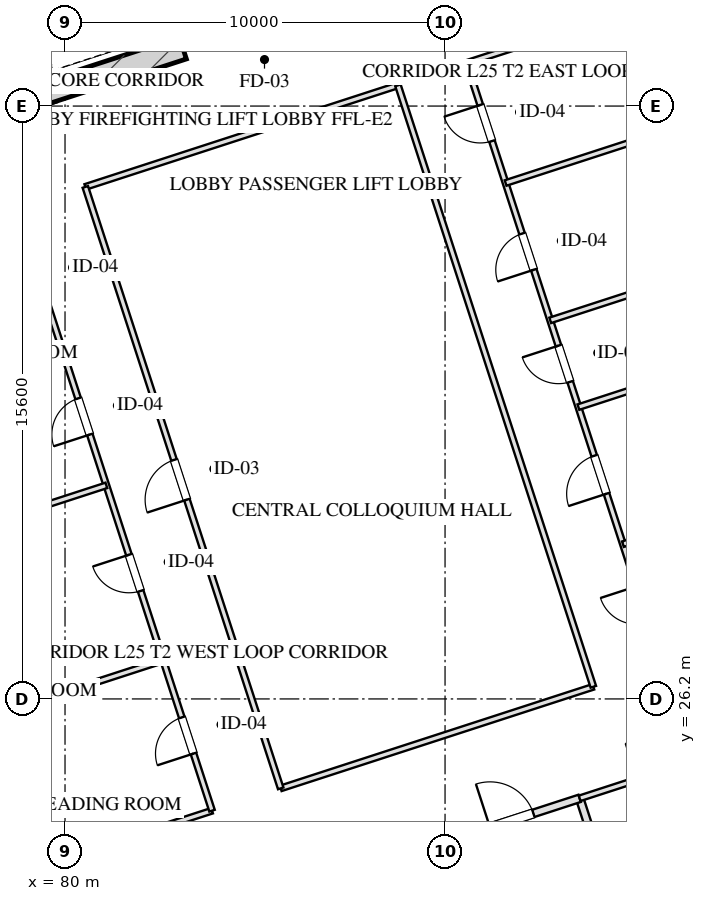
"""IFC4 building model, lengths in metres.
Left out: names, types, materials, properties, quantities, classifications, styles, units other than length and angle.
Written with IfcOpenShell. Run it as: python <this file> out.ifc"""

import sys

from ifc_helpers import new_model, si_unit, direction, frame, frame_2d, origin, place, context, subcontext, project, spatial, rectangle, extrude, element, fill, save


model = new_model("IFC4")
c1 = context("Model", 3, precision=1e-05, world=origin(), true_north=direction((0.0, 1.0)))
c2 = subcontext(c1, "Body", "Model", "MODEL_VIEW")
j1 = project(units=[si_unit("LENGTHUNIT", "METRE"), si_unit("PLANEANGLEUNIT", "RADIAN")], contexts=[c1])
p1 = place(None, origin())
s1 = spatial("IfcSite", under=j1, at=p1, CompositionType="ELEMENT")
p2 = place(p1, origin())
s2 = spatial("IfcBuilding", under=s1, at=p2, CompositionType="ELEMENT")
p3 = place(p2, frame((0.0, 0.0, 100.05)))
s3 = spatial("IfcBuildingStorey", under=s2, at=p3, CompositionType="ELEMENT", Elevation=100.05)
p4 = place(p3, frame((79.466, 41.828, 0.0), z_axis=(0.0, 0.0, 1.0), x_axis=(-0.309041232772, 0.951048640421, 0.0)))
e1 = element("IfcWall", 1, at=p4, inside=s3, PredefinedType="SHEAR", context=c2, shape_type="SweptSolid", body=[
    extrude(rectangle(XDim=9.48, YDim=0.6, at=frame_2d((4.74, 0.0))), origin(), (0.0, 0.0, 1.0), 3.45),
])
p5 = place(p3, frame((79.087, 42.021, 0.0), z_axis=(0.0, 0.0, 1.0), x_axis=(0.951062550203, 0.3089984233, 0.0)))
e2 = element("IfcWall", 2, at=p5, inside=s3, PredefinedType="SHEAR", context=c2, shape_type="SweptSolid", body=[
    extrude(rectangle(XDim=4.22, YDim=0.6, at=frame_2d((2.11, 0.0))), origin(), (0.0, 0.0, 1.0), 3.45),
])
p6 = place(p3, frame((80.716, 6.59, 0.0), z_axis=(0.0, 0.0, 1.0), x_axis=(-0.309017542002, 0.95105633836, 0.0)))
e3 = element("IfcWall", 3, at=p6, inside=s3, PredefinedType="SOLIDWALL", context=c2, shape_type="SweptSolid", body=[
    extrude(rectangle(XDim=46.4, YDim=0.4, at=frame_2d((23.2, 0.0))), origin(), (0.0, 0.0, 1.0), 2.55),
])
p7 = place(p6, frame((15.6, 0.0, 0.75)))
e4 = element("IfcOpeningElement", 4, at=p7, cuts=e3, PredefinedType="OPENING", context=c2, shape_type="SweptSolid", body=[
    extrude(rectangle(XDim=2.4, YDim=1.4, at=frame_2d((1.2, 0.7))), frame((0.0, 0.21, 0.0), z_axis=(0.0, -1.0, 0.0), x_axis=(1.0, 0.0, 0.0)), (0.0, 0.0, 1.0), 0.42),
])
p8 = place(p6, frame((19.4, 0.0, 0.75)))
e5 = element("IfcOpeningElement", 5, at=p8, cuts=e3, PredefinedType="OPENING", context=c2, shape_type="SweptSolid", body=[
    extrude(rectangle(XDim=2.4, YDim=1.4, at=frame_2d((1.2, 0.7))), frame((0.0, 0.21, 0.0), z_axis=(0.0, -1.0, 0.0), x_axis=(1.0, 0.0, 0.0)), (0.0, 0.0, 1.0), 0.42),
])
p9 = place(p6, frame((25.496, 0.0, 0.0)))
e6 = element("IfcOpeningElement", 6, at=p9, cuts=e3, PredefinedType="OPENING", context=c2, shape_type="SweptSolid", body=[
    extrude(rectangle(XDim=1.1, YDim=2.15, at=frame_2d((0.55, 1.075))), frame((0.0, 0.21, 0.0), z_axis=(0.0, -1.0, 0.0), x_axis=(1.0, 0.0, 0.0)), (0.0, 0.0, 1.0), 0.42),
])
p10 = place(p3, frame((93.542, 23.585, 0.0), z_axis=(0.0, 0.0, 1.0), x_axis=(0.309042196757, -0.951048327176, 0.0)))
e7 = element("IfcWall", 7, at=p10, inside=s3, PredefinedType="PARTITIONING", context=c2, shape_type="SweptSolid", body=[
    extrude(rectangle(XDim=8.43, YDim=0.2, at=frame_2d((4.215, 0.0))), origin(), (0.0, 0.0, 1.0), 3.155),
])
p11 = place(p3, frame((89.899, 22.401, 0.0), z_axis=(0.0, 0.0, 1.0), x_axis=(0.951046716504, 0.309047153403, 0.0)))
e8 = element("IfcWall", 8, at=p11, inside=s3, PredefinedType="PARTITIONING", context=c2, shape_type="SweptSolid", body=[
    extrude(rectangle(XDim=3.83, YDim=0.2, at=frame_2d((1.915, 0.0))), origin(), (0.0, 0.0, 1.0), 3.155),
])
p12 = place(p11, frame((1.35, 0.0, 0.0)))
e9 = element("IfcOpeningElement", 9, at=p12, cuts=e8, PredefinedType="OPENING", context=c2, shape_type="SweptSolid", body=[
    extrude(rectangle(XDim=1.2, YDim=2.05, at=frame_2d((0.6, 1.025))), frame((0.0, 0.11, 0.0), z_axis=(0.0, -1.0, 0.0), x_axis=(1.0, 0.0, 0.0)), (0.0, 0.0, 1.0), 0.22),
])
p13 = place(p3, frame((93.542, 23.585, 0.0), z_axis=(0.0, 0.0, 1.0), x_axis=(0.951063829732, 0.308994485023, 0.0)))
e10 = element("IfcWall", 10, at=p13, inside=s3, PredefinedType="PARTITIONING", context=c2, shape_type="SweptSolid", body=[
    extrude(rectangle(XDim=4.4, YDim=0.15, at=frame_2d((2.2, 0.0))), origin(), (0.0, 0.0, 1.0), 3.155),
])
p14 = place(p13, frame((1.6, 0.0, 0.0)))
e11 = element("IfcOpeningElement", 11, at=p14, cuts=e10, PredefinedType="OPENING", context=c2, shape_type="SweptSolid", body=[
    extrude(rectangle(XDim=1.0, YDim=2.05, at=frame_2d((0.5, 1.025))), frame((0.0, 0.085, 0.0), z_axis=(0.0, -1.0, 0.0), x_axis=(1.0, 0.0, 0.0)), (0.0, 0.0, 1.0), 0.17),
])
p15 = place(p3, frame((76.308, 20.803, 0.0), z_axis=(0.0, 0.0, 1.0), x_axis=(0.95105437725, 0.3090235776, 0.0)))
e12 = element("IfcWall", 12, at=p15, inside=s3, PredefinedType="PARTITIONING", context=c2, shape_type="SweptSolid", body=[
    extrude(rectangle(XDim=7.95, YDim=0.15, at=frame_2d((3.975, 0.0))), origin(), (0.0, 0.0, 1.0), 3.155),
])
p16 = place(p3, frame((85.676, 23.847, 0.0), z_axis=(0.0, 0.0, 1.0), x_axis=(0.951063309554, 0.308996086091, 0.0)))
e13 = element("IfcWall", 13, at=p16, inside=s3, PredefinedType="PARTITIONING", context=c2, shape_type="SweptSolid", body=[
    extrude(rectangle(XDim=8.65, YDim=0.15, at=frame_2d((4.325, 0.0))), origin(), (0.0, 0.0, 1.0), 3.155),
])
p17 = place(p3, frame((80.534, 39.672, 0.0), z_axis=(0.0, 0.0, 1.0), x_axis=(0.951052319652, 0.309029910015, 0.0)))
e14 = element("IfcWall", 14, at=p17, inside=s3, PredefinedType="PARTITIONING", context=c2, shape_type="SweptSolid", body=[
    extrude(rectangle(XDim=8.65, YDim=0.15, at=frame_2d((4.325, 0.0))), origin(), (0.0, 0.0, 1.0), 3.155),
])
p18 = place(p3, frame((90.567, 42.933, 0.0), z_axis=(0.0, 0.0, 1.0), x_axis=(0.951058377365, 0.309011266531, 0.0)))
e15 = element("IfcWall", 15, at=p18, inside=s3, PredefinedType="PARTITIONING", context=c2, shape_type="SweptSolid", body=[
    extrude(rectangle(XDim=13.8, YDim=0.15, at=frame_2d((6.9, 0.0))), origin(), (0.0, 0.0, 1.0), 3.155),
])
p19 = place(p3, frame((83.869, 23.26, 0.0), z_axis=(0.0, 0.0, 1.0), x_axis=(-0.309022042254, 0.951054876125, 0.0)))
e16 = element("IfcWall", 16, at=p19, inside=s3, PredefinedType="PARTITIONING", context=c2, shape_type="SweptSolid", body=[
    extrude(rectangle(XDim=16.64, YDim=0.15, at=frame_2d((8.32, 0.0))), origin(), (0.0, 0.0, 1.0), 3.155),
])
p20 = place(p19, frame((1.58, 0.0, 0.0)))
e17 = element("IfcOpeningElement", 17, at=p20, cuts=e16, PredefinedType="OPENING", context=c2, shape_type="SweptSolid", body=[
    extrude(rectangle(XDim=1.0, YDim=2.05, at=frame_2d((0.5, 1.025))), frame((0.0, 0.085, 0.0), z_axis=(0.0, -1.0, 0.0), x_axis=(1.0, 0.0, 0.0)), (0.0, 0.0, 1.0), 0.17),
])
p21 = place(p19, frame((6.08, 0.0, 0.0)))
e18 = element("IfcOpeningElement", 18, at=p21, cuts=e16, PredefinedType="OPENING", context=c2, shape_type="SweptSolid", body=[
    extrude(rectangle(XDim=1.0, YDim=2.05, at=frame_2d((0.5, 1.025))), frame((0.0, 0.085, 0.0), z_axis=(0.0, -1.0, 0.0), x_axis=(1.0, 0.0, 0.0)), (0.0, 0.0, 1.0), 0.17),
])
p22 = place(p19, frame((10.406, 0.0, 0.0)))
e19 = element("IfcOpeningElement", 19, at=p22, cuts=e16, PredefinedType="OPENING", context=c2, shape_type="SweptSolid", body=[
    extrude(rectangle(XDim=1.0, YDim=2.05, at=frame_2d((0.5, 1.025))), frame((0.0, 0.085, 0.0), z_axis=(0.0, -1.0, 0.0), x_axis=(1.0, 0.0, 0.0)), (0.0, 0.0, 1.0), 0.17),
])
p23 = place(p19, frame((14.226, 0.0, 0.0)))
e20 = element("IfcOpeningElement", 20, at=p23, cuts=e16, PredefinedType="OPENING", context=c2, shape_type="SweptSolid", body=[
    extrude(rectangle(XDim=1.0, YDim=2.05, at=frame_2d((0.5, 1.025))), frame((0.0, 0.085, 0.0), z_axis=(0.0, -1.0, 0.0), x_axis=(1.0, 0.0, 0.0)), (0.0, 0.0, 1.0), 0.17),
])
p24 = place(p3, frame((85.676, 23.847, 0.0), z_axis=(0.0, 0.0, 1.0), x_axis=(-0.309008771245, 0.951059188113, 0.0)))
e21 = element("IfcWall", 21, at=p24, inside=s3, PredefinedType="PARTITIONING", context=c2, shape_type="SweptSolid", body=[
    extrude(rectangle(XDim=16.64, YDim=0.15, at=frame_2d((8.32, 0.0))), origin(), (0.0, 0.0, 1.0), 3.155),
])
p25 = place(p24, frame((7.987, 0.0, 0.0)))
e22 = element("IfcOpeningElement", 22, at=p25, cuts=e21, PredefinedType="OPENING", context=c2, shape_type="SweptSolid", body=[
    extrude(rectangle(XDim=1.1, YDim=2.05, at=frame_2d((0.55, 1.025))), frame((0.0, 0.085, 0.0), z_axis=(0.0, -1.0, 0.0), x_axis=(1.0, 0.0, 0.0)), (0.0, 0.0, 1.0), 0.17),
])
p26 = place(p3, frame((93.903, 26.52, 0.0), z_axis=(0.0, 0.0, 1.0), x_axis=(-0.30901773025, 0.951056277195, 0.0)))
e23 = element("IfcWall", 23, at=p26, inside=s3, PredefinedType="PARTITIONING", context=c2, shape_type="SweptSolid", body=[
    extrude(rectangle(XDim=16.64, YDim=0.15, at=frame_2d((8.32, 0.0))), origin(), (0.0, 0.0, 1.0), 3.155),
])
p27 = place(p3, frame((95.709, 27.107, 0.0), z_axis=(0.0, 0.0, 1.0), x_axis=(-0.30901773025, 0.951056277195, 0.0)))
e24 = element("IfcWall", 24, at=p27, inside=s3, PredefinedType="PARTITIONING", context=c2, shape_type="SweptSolid", body=[
    extrude(rectangle(XDim=16.64, YDim=0.15, at=frame_2d((8.32, 0.0))), origin(), (0.0, 0.0, 1.0), 3.155),
])
p28 = place(p27, frame((1.164, 0.0, 0.0)))
e25 = element("IfcOpeningElement", 25, at=p28, cuts=e24, PredefinedType="OPENING", context=c2, shape_type="SweptSolid", body=[
    extrude(rectangle(XDim=1.0, YDim=2.05, at=frame_2d((0.5, 1.025))), frame((0.0, 0.085, 0.0), z_axis=(0.0, -1.0, 0.0), x_axis=(1.0, 0.0, 0.0)), (0.0, 0.0, 1.0), 0.17),
])
p29 = place(p27, frame((4.724, 0.0, 0.0)))
e26 = element("IfcOpeningElement", 26, at=p29, cuts=e24, PredefinedType="OPENING", context=c2, shape_type="SweptSolid", body=[
    extrude(rectangle(XDim=1.05, YDim=2.05, at=frame_2d((0.525, 1.025))), frame((0.0, 0.085, 0.0), z_axis=(0.0, -1.0, 0.0), x_axis=(1.0, 0.0, 0.0)), (0.0, 0.0, 1.0), 0.17),
])
p30 = place(p27, frame((7.82, 0.0, 0.0)))
e27 = element("IfcOpeningElement", 27, at=p30, cuts=e24, PredefinedType="OPENING", context=c2, shape_type="SweptSolid", body=[
    extrude(rectangle(XDim=1.0, YDim=2.05, at=frame_2d((0.5, 1.025))), frame((0.0, 0.085, 0.0), z_axis=(0.0, -1.0, 0.0), x_axis=(1.0, 0.0, 0.0)), (0.0, 0.0, 1.0), 0.17),
])
p31 = place(p27, frame((10.92, 0.0, 0.0)))
e28 = element("IfcOpeningElement", 28, at=p31, cuts=e24, PredefinedType="OPENING", context=c2, shape_type="SweptSolid", body=[
    extrude(rectangle(XDim=1.0, YDim=2.05, at=frame_2d((0.5, 1.025))), frame((0.0, 0.085, 0.0), z_axis=(0.0, -1.0, 0.0), x_axis=(1.0, 0.0, 0.0)), (0.0, 0.0, 1.0), 0.17),
])
p32 = place(p27, frame((14.48, 0.0, 0.0)))
e29 = element("IfcOpeningElement", 29, at=p32, cuts=e24, PredefinedType="OPENING", context=c2, shape_type="SweptSolid", body=[
    extrude(rectangle(XDim=1.0, YDim=2.05, at=frame_2d((0.5, 1.025))), frame((0.0, 0.085, 0.0), z_axis=(0.0, -1.0, 0.0), x_axis=(1.0, 0.0, 0.0)), (0.0, 0.0, 1.0), 0.17),
])
for number, where, z_axis, x_axis in (
    (30, (75.022, 24.76, 0.0), (0.0, 0.0, 1.0), (0.951, 0.309, 0.0)),
    (31, (73.527, 29.363, 0.0), (0.0, 0.0, 1.0), (0.951, 0.309, 0.0)),
    (32, (72.349, 32.989, 0.0), (0.0, 0.0, 1.0), (0.951, 0.309, 0.0)),
):
    element("IfcWall", number, at=place(p3, frame(where, z_axis=z_axis, x_axis=x_axis)), inside=s3, PredefinedType="PARTITIONING", context=c2, shape_type="SweptSolid", body=[
        extrude(rectangle(XDim=7.95, YDim=0.15, at=frame_2d((3.975, 0.0))), origin(), (0.0, 0.0, 1.0), 3.155),
    ])
p33 = place(p3, frame((94.681, 30.272, 0.0), z_axis=(0.0, 0.0, 1.0), x_axis=(0.951051488548, 0.309032467762, 0.0)))
e33 = element("IfcWall", 33, at=p33, inside=s3, PredefinedType="PARTITIONING", context=c2, shape_type="SweptSolid", body=[
    extrude(rectangle(XDim=13.8, YDim=0.15, at=frame_2d((6.9, 0.0))), origin(), (0.0, 0.0, 1.0), 3.155),
])
p34 = place(p3, frame((93.509, 33.878, 0.0), z_axis=(0.0, 0.0, 1.0), x_axis=(0.951056688031, 0.309016465825, 0.0)))
e34 = element("IfcWall", 34, at=p34, inside=s3, PredefinedType="PARTITIONING", context=c2, shape_type="SweptSolid", body=[
    extrude(rectangle(XDim=13.8, YDim=0.15, at=frame_2d((6.9, 0.0))), origin(), (0.0, 0.0, 1.0), 3.155),
])
p35 = place(p3, frame((92.768, 36.161, 0.0), z_axis=(0.0, 0.0, 1.0), x_axis=(0.951058377365, 0.309011266531, 0.0)))
e35 = element("IfcWall", 35, at=p35, inside=s3, PredefinedType="PARTITIONING", context=c2, shape_type="SweptSolid", body=[
    extrude(rectangle(XDim=13.8, YDim=0.15, at=frame_2d((6.9, 0.0))), origin(), (0.0, 0.0, 1.0), 3.155),
])
p36 = place(p3, frame((91.594, 39.775, 0.0), z_axis=(0.0, 0.0, 1.0), x_axis=(0.951056688031, 0.309016465825, 0.0)))
e36 = element("IfcWall", 36, at=p36, inside=s3, PredefinedType="PARTITIONING", context=c2, shape_type="SweptSolid", body=[
    extrude(rectangle(XDim=13.8, YDim=0.15, at=frame_2d((6.9, 0.0))), origin(), (0.0, 0.0, 1.0), 3.155),
])
p37 = place(p12, origin())
e37 = element("IfcDoor", 37, at=p37, inside=s3, OperationType="SINGLE_SWING_LEFT", PredefinedType="DOOR", context=c2, shape_type="SweptSolid", body=[
    extrude(rectangle(XDim=1.2, YDim=2.05, at=frame_2d((0.6, 1.025))), frame((0.0, 0.025, 0.0), z_axis=(0.0, -1.0, 0.0), x_axis=(1.0, 0.0, 0.0)), (0.0, 0.0, 1.0), 0.05),
])
fill(e9, e37)
p38 = place(p20, origin())
e38 = element("IfcDoor", 38, at=p38, inside=s3, OperationType="SINGLE_SWING_LEFT", PredefinedType="DOOR", context=c2, shape_type="SweptSolid", body=[
    extrude(rectangle(XDim=1.0, YDim=2.05, at=frame_2d((0.5, 1.025))), frame((0.0, 0.025, 0.0), z_axis=(0.0, -1.0, 0.0), x_axis=(1.0, 0.0, 0.0)), (0.0, 0.0, 1.0), 0.05),
])
fill(e17, e38)
p39 = place(p21, origin())
e39 = element("IfcDoor", 39, at=p39, inside=s3, OperationType="SINGLE_SWING_RIGHT", PredefinedType="DOOR", context=c2, shape_type="SweptSolid", body=[
    extrude(rectangle(XDim=1.0, YDim=2.05, at=frame_2d((0.5, 1.025))), frame((0.0, 0.025, 0.0), z_axis=(0.0, -1.0, 0.0), x_axis=(1.0, 0.0, 0.0)), (0.0, 0.0, 1.0), 0.05),
])
fill(e18, e39)
p40 = place(p22, origin())
e40 = element("IfcDoor", 40, at=p40, inside=s3, OperationType="SINGLE_SWING_LEFT", PredefinedType="DOOR", context=c2, shape_type="SweptSolid", body=[
    extrude(rectangle(XDim=1.0, YDim=2.05, at=frame_2d((0.5, 1.025))), frame((0.0, 0.025, 0.0), z_axis=(0.0, -1.0, 0.0), x_axis=(1.0, 0.0, 0.0)), (0.0, 0.0, 1.0), 0.05),
])
fill(e19, e40)
p41 = place(p25, origin())
e41 = element("IfcDoor", 41, at=p41, inside=s3, OperationType="SINGLE_SWING_LEFT", PredefinedType="DOOR", context=c2, shape_type="SweptSolid", body=[
    extrude(rectangle(XDim=1.1, YDim=2.05, at=frame_2d((0.55, 1.025))), frame((0.0, 0.025, 0.0), z_axis=(0.0, -1.0, 0.0), x_axis=(1.0, 0.0, 0.0)), (0.0, 0.0, 1.0), 0.05),
])
fill(e22, e41)
p42 = place(p29, origin())
e42 = element("IfcDoor", 42, at=p42, inside=s3, OperationType="SINGLE_SWING_LEFT", PredefinedType="DOOR", context=c2, shape_type="SweptSolid", body=[
    extrude(rectangle(XDim=1.05, YDim=2.05, at=frame_2d((0.525, 1.025))), frame((0.0, 0.025, 0.0), z_axis=(0.0, -1.0, 0.0), x_axis=(1.0, 0.0, 0.0)), (0.0, 0.0, 1.0), 0.05),
])
fill(e26, e42)
p43 = place(p30, origin())
e43 = element("IfcDoor", 43, at=p43, inside=s3, OperationType="SINGLE_SWING_RIGHT", PredefinedType="DOOR", context=c2, shape_type="SweptSolid", body=[
    extrude(rectangle(XDim=1.0, YDim=2.05, at=frame_2d((0.5, 1.025))), frame((0.0, 0.025, 0.0), z_axis=(0.0, -1.0, 0.0), x_axis=(1.0, 0.0, 0.0)), (0.0, 0.0, 1.0), 0.05),
])
fill(e27, e43)
p44 = place(p31, origin())
e44 = element("IfcDoor", 44, at=p44, inside=s3, OperationType="SINGLE_SWING_LEFT", PredefinedType="DOOR", context=c2, shape_type="SweptSolid", body=[
    extrude(rectangle(XDim=1.0, YDim=2.05, at=frame_2d((0.5, 1.025))), frame((0.0, 0.025, 0.0), z_axis=(0.0, -1.0, 0.0), x_axis=(1.0, 0.0, 0.0)), (0.0, 0.0, 1.0), 0.05),
])
fill(e28, e44)
p45 = place(p32, origin())
e45 = element("IfcDoor", 45, at=p45, inside=s3, OperationType="SINGLE_SWING_RIGHT", PredefinedType="DOOR", context=c2, shape_type="SweptSolid", body=[
    extrude(rectangle(XDim=1.0, YDim=2.05, at=frame_2d((0.5, 1.025))), frame((0.0, 0.025, 0.0), z_axis=(0.0, -1.0, 0.0), x_axis=(1.0, 0.0, 0.0)), (0.0, 0.0, 1.0), 0.05),
])
fill(e29, e45)
save(model, sys.argv[1])
